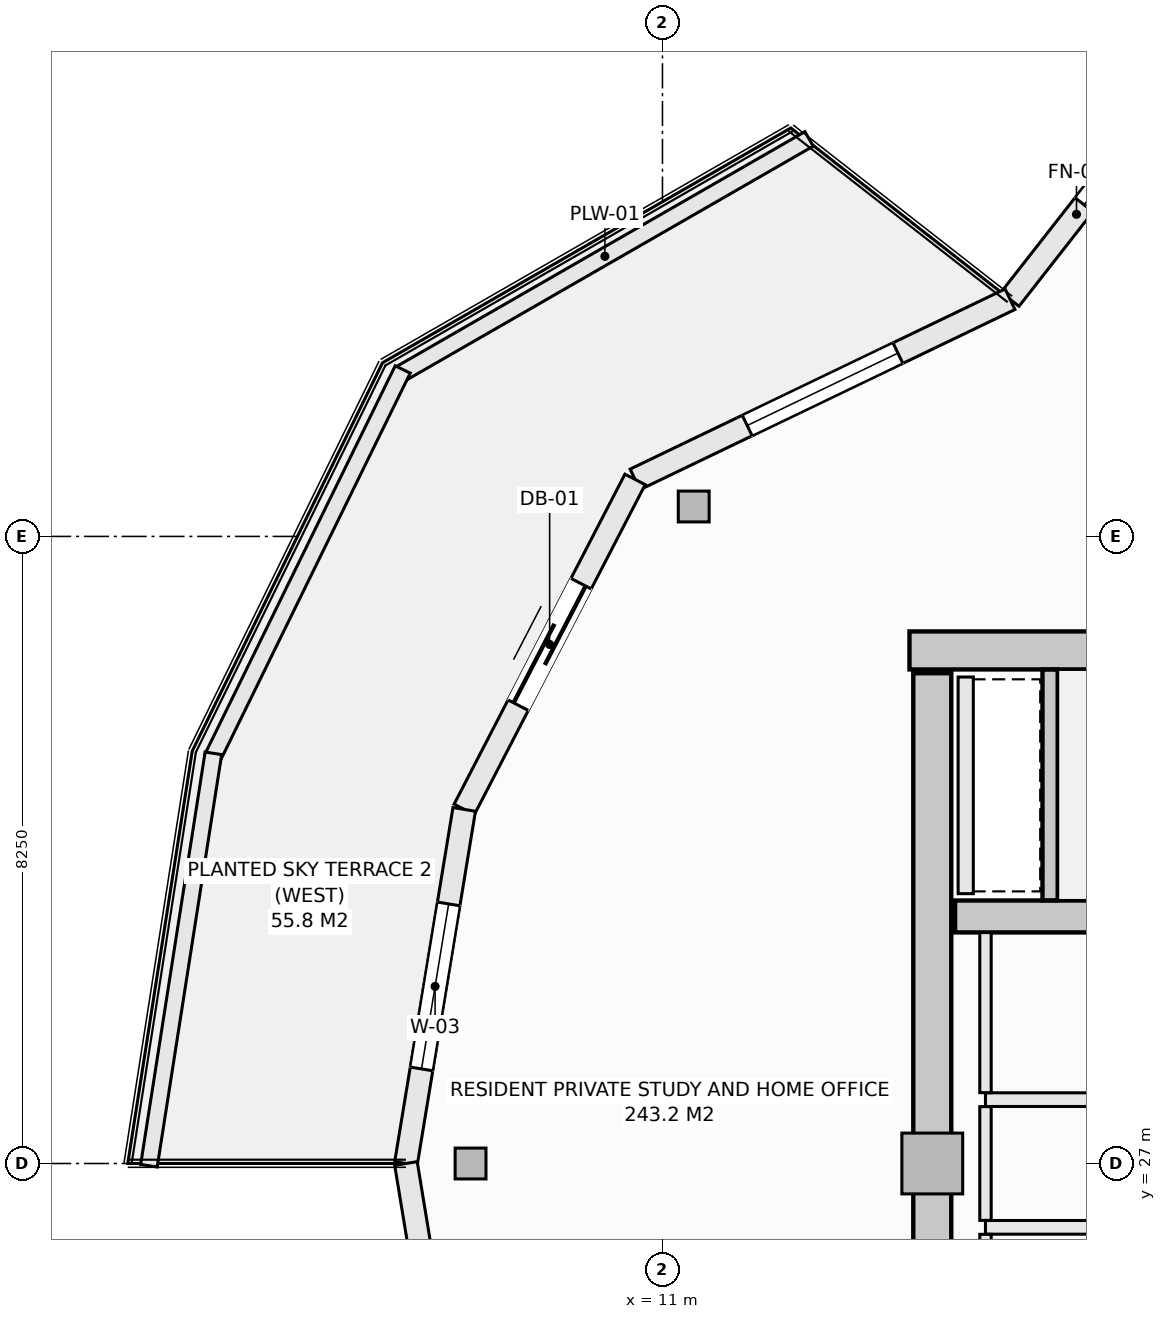
"""IFC4 building model, lengths in metres.
Left out: names, types, materials, properties, quantities, classifications, styles, units other than length and angle.
Written with IfcOpenShell. Run it as: python <this file> out.ifc"""

import sys

from ifc_helpers import new_model, si_unit, direction, frame, frame_2d, origin, origin_2d, place, context, subcontext, project, spatial, rectangle, hollow_rectangle, extrude, element, fill, save


model = new_model("IFC4")
c1 = context("Model", 3, precision=1e-05, world=origin(), true_north=direction((0.0, 1.0)))
c2 = subcontext(c1, "Body", "Model", "MODEL_VIEW")
j1 = project(units=[si_unit("LENGTHUNIT", "METRE"), si_unit("PLANEANGLEUNIT", "RADIAN")], contexts=[c1])
p1 = place(None, origin())
s1 = spatial("IfcSite", under=j1, at=p1, CompositionType="ELEMENT")
p2 = place(p1, origin())
s2 = spatial("IfcBuilding", under=s1, at=p2, CompositionType="ELEMENT")
p3 = place(p2, frame((0.0, 0.0, 249.2)))
s3 = spatial("IfcBuildingStorey", under=s2, at=p3, CompositionType="ELEMENT", Elevation=249.2)
p4 = place(p3, frame((14.25, 33.75, -0.27), z_axis=(0.0, 0.0, 1.0), x_axis=(1.0, 0.0, 0.0)))
e1 = element("IfcWall", 1, at=p4, inside=s3, PredefinedType="SHEAR", context=c2, shape_type="SweptSolid", body=[
    extrude(rectangle(XDim=13.5, YDim=0.5, at=frame_2d((6.75, 0.0))), origin(), (0.0, 0.0, 1.0), 3.3),
])
p5 = place(p3, frame((14.55, 20.55, -0.27), z_axis=(0.0, 0.0, 1.0), x_axis=(0.0, 1.0, 0.0)))
e2 = element("IfcWall", 2, at=p5, inside=s3, PredefinedType="SHEAR", context=c2, shape_type="SweptSolid", body=[
    extrude(rectangle(XDim=12.9, YDim=0.5, at=frame_2d((6.45, 0.0))), origin(), (0.0, 0.0, 1.0), 3.3),
])
p6 = place(p3, frame((14.85, 30.25, -0.27), z_axis=(0.0, 0.0, 1.0), x_axis=(1.0, 0.0, 0.0)))
e3 = element("IfcWall", 3, at=p6, inside=s3, PredefinedType="SHEAR", context=c2, shape_type="SweptSolid", body=[
    extrude(rectangle(XDim=7.3, YDim=0.42, at=frame_2d((3.65, 0.0))), origin(), (0.0, 0.0, 1.0), 3.3),
])
for number, where, z_axis, x_axis in (
    (4, (11.411, 35.644, -0.27), (0.0, 0.0, 1.0), (1.0, 0.0, 0.0)),
    (5, (8.475, 27.0, -0.27), (0.0, 0.0, 1.0), (1.0, 0.0, 0.0)),
):
    element("IfcColumn", number, at=place(p3, frame(where, z_axis=z_axis, x_axis=x_axis)), inside=s3, PredefinedType="COLUMN", context=c2, shape_type="SweptSolid", body=[
        extrude(hollow_rectangle(XDim=0.406, YDim=0.406, WallThickness=0.016, at=origin_2d()), origin(), (0.0, 0.0, 1.0), 3.3),
    ])
p7 = place(p3, frame((14.55, 27.0, -0.27), z_axis=(0.0, 0.0, 1.0), x_axis=(1.0, 0.0, 0.0)))
e6 = element("IfcColumn", 6, at=p7, inside=s3, PredefinedType="PILASTER", context=c2, shape_type="SweptSolid", body=[
    extrude(rectangle(XDim=0.8, YDim=0.8, at=origin_2d()), origin(), (0.0, 0.0, 1.0), 3.3),
])
p8 = place(p3, frame((15.573, 38.37, 0.0), z_axis=(0.0, 0.0, 1.0), x_axis=(0.61644588519, 0.787397276241, 0.0)))
e7 = element("IfcWall", 7, at=p8, inside=s3, PredefinedType="SOLIDWALL", context=c2, shape_type="SweptSolid", body=[
    extrude(rectangle(XDim=5.357, YDim=0.3, at=frame_2d((2.678, 0.0))), origin(), (0.0, 0.0, 1.0), 2.605),
])
p9 = place(p8, frame((1.579, 0.0, 0.72)))
e8 = element("IfcOpeningElement", 8, at=p9, cuts=e7, PredefinedType="OPENING", context=c2, shape_type="SweptSolid", body=[
    extrude(rectangle(XDim=2.2, YDim=1.65, at=frame_2d((1.1, 0.825))), frame((0.0, 0.16, 0.0), z_axis=(0.0, -1.0, 0.0), x_axis=(1.0, 0.0, 0.0)), (0.0, 0.0, 1.0), 0.32),
])
p10 = place(p3, frame((10.639, 36.0, 0.0), z_axis=(0.0, 0.0, 1.0), x_axis=(0.901355238351, 0.433080517106, 0.0)))
e9 = element("IfcWall", 9, at=p10, inside=s3, PredefinedType="SOLIDWALL", context=c2, shape_type="SweptSolid", body=[
    extrude(rectangle(XDim=5.473, YDim=0.3, at=frame_2d((2.737, 0.0))), origin(), (0.0, 0.0, 1.0), 2.605),
])
p11 = place(p10, frame((1.637, 0.0, 0.72)))
e10 = element("IfcOpeningElement", 10, at=p11, cuts=e9, PredefinedType="OPENING", context=c2, shape_type="SweptSolid", body=[
    extrude(rectangle(XDim=2.2, YDim=1.65, at=frame_2d((1.1, 0.825))), frame((0.0, 0.16, 0.0), z_axis=(0.0, -1.0, 0.0), x_axis=(1.0, 0.0, 0.0)), (0.0, 0.0, 1.0), 0.32),
])
p12 = place(p3, frame((8.392, 31.659, 0.0), z_axis=(0.0, 0.0, 1.0), x_axis=(0.459793771602, 0.888025724625, 0.0)))
e11 = element("IfcWall", 11, at=p12, inside=s3, PredefinedType="SOLIDWALL", context=c2, shape_type="SweptSolid", body=[
    extrude(rectangle(XDim=4.889, YDim=0.3, at=frame_2d((2.444, 0.0))), origin(), (0.0, 0.0, 1.0), 2.605),
])
p13 = place(p12, frame((1.544, 0.0, 0.0)))
e12 = element("IfcOpeningElement", 12, at=p13, cuts=e11, PredefinedType="OPENING", context=c2, shape_type="SweptSolid", body=[
    extrude(rectangle(XDim=1.8, YDim=2.25, at=frame_2d((0.9, 1.125))), frame((0.0, 0.16, 0.0), z_axis=(0.0, -1.0, 0.0), x_axis=(1.0, 0.0, 0.0)), (0.0, 0.0, 1.0), 0.32),
])
p14 = place(p3, frame((7.625, 27.0, 0.0), z_axis=(0.0, 0.0, 1.0), x_axis=(0.162369371657, 0.986730047758, 0.0)))
e13 = element("IfcWall", 13, at=p14, inside=s3, PredefinedType="SOLIDWALL", context=c2, shape_type="SweptSolid", body=[
    extrude(rectangle(XDim=4.721, YDim=0.3, at=frame_2d((2.361, 0.0))), origin(), (0.0, 0.0, 1.0), 2.605),
])
p15 = place(p14, frame((1.261, 0.0, 0.72)))
e14 = element("IfcOpeningElement", 14, at=p15, cuts=e13, PredefinedType="OPENING", context=c2, shape_type="SweptSolid", body=[
    extrude(rectangle(XDim=2.2, YDim=1.65, at=frame_2d((1.1, 0.825))), frame((0.0, 0.16, 0.0), z_axis=(0.0, -1.0, 0.0), x_axis=(1.0, 0.0, 0.0)), (0.0, 0.0, 1.0), 0.32),
])
p16 = place(p3, frame((7.625, 27.0, 0.0), z_axis=(0.0, 0.0, 1.0), x_axis=(0.162369371657, -0.986730047758, 0.0)))
e15 = element("IfcWall", 15, at=p16, inside=s3, PredefinedType="SOLIDWALL", context=c2, shape_type="SweptSolid", body=[
    extrude(rectangle(XDim=4.721, YDim=0.3, at=frame_2d((2.361, 0.0))), origin(), (0.0, 0.0, 1.0), 2.605),
])
p17 = place(p16, frame((1.261, 0.0, 0.72)))
e16 = element("IfcOpeningElement", 16, at=p17, cuts=e15, PredefinedType="OPENING", context=c2, shape_type="SweptSolid", body=[
    extrude(rectangle(XDim=2.2, YDim=1.65, at=frame_2d((1.1, 0.825))), frame((0.0, 0.16, 0.0), z_axis=(0.0, -1.0, 0.0), x_axis=(1.0, 0.0, 0.0)), (0.0, 0.0, 1.0), 0.32),
])
p18 = place(p3, frame((7.557, 37.391, 0.0), z_axis=(0.0, 0.0, 1.0), x_axis=(0.866901621005, 0.49847926687, 0.0)))
e17 = element("IfcWall", 17, at=p18, inside=s3, PredefinedType="PARAPET", context=c2, shape_type="SweptSolid", body=[
    extrude(rectangle(XDim=6.197, YDim=0.22, at=frame_2d((3.098, 0.0))), origin(), (0.0, 0.0, 1.0), 0.52),
])
p19 = place(p3, frame((5.079, 32.338, 0.0), z_axis=(0.0, 0.0, 1.0), x_axis=(0.440058847499, 0.897968936399, 0.0)))
e18 = element("IfcWall", 18, at=p19, inside=s3, PredefinedType="PARAPET", context=c2, shape_type="SweptSolid", body=[
    extrude(rectangle(XDim=5.689, YDim=0.22, at=frame_2d((2.845, 0.0))), origin(), (0.0, 0.0, 1.0), 0.52),
])
p20 = place(p3, frame((4.243, 26.971, 0.0), z_axis=(0.0, 0.0, 1.0), x_axis=(0.154441975483, 0.988001860428, 0.0)))
e19 = element("IfcWall", 19, at=p20, inside=s3, PredefinedType="PARAPET", context=c2, shape_type="SweptSolid", body=[
    extrude(rectangle(XDim=5.492, YDim=0.22, at=frame_2d((2.746, 0.0))), origin(), (0.0, 0.0, 1.0), 0.52),
])
p21 = place(p3, frame((16.1, 30.462, -0.27), z_axis=(0.0, 0.0, 1.0), x_axis=(0.0, 1.0, 0.0)))
e20 = element("IfcWall", 20, at=p21, inside=s3, PredefinedType="SHEAR", context=c2, shape_type="SweptSolid", body=[
    extrude(rectangle(XDim=3.036, YDim=0.2, at=frame_2d((1.518, 0.0))), origin(), (0.0, 0.0, 1.0), 3.3),
])
p22 = place(p3, frame((14.99, 30.55, 0.0), z_axis=(0.0, 0.0, 1.0), x_axis=(0.0, 1.0, 0.0)))
e21 = element("IfcWall", 21, at=p22, inside=s3, PredefinedType="SOLIDWALL", context=c2, shape_type="SweptSolid", body=[
    extrude(rectangle(XDim=2.85, YDim=0.2, at=frame_2d((1.425, 0.0))), origin(), (0.0, 0.0, 1.0), 3.03),
])
p23 = place(p3, frame((15.25, 27.84, 0.0), z_axis=(0.0, 0.0, 1.0), x_axis=(1.0, 0.0, 0.0)))
e22 = element("IfcWall", 22, at=p23, inside=s3, PredefinedType="SOLIDWALL", context=c2, shape_type="SweptSolid", body=[
    extrude(rectangle(XDim=6.9, YDim=0.18, at=frame_2d((3.45, 0.0))), origin(), (0.0, 0.0, 1.0), 3.03),
])
p24 = place(p23, frame((5.02, 0.0, 0.0)))
e23 = element("IfcOpeningElement", 23, at=p24, cuts=e22, PredefinedType="OPENING", context=c2, shape_type="SweptSolid", body=[
    extrude(rectangle(XDim=0.95, YDim=2.1, at=frame_2d((0.475, 1.05))), frame((0.0, 0.1, 0.0), z_axis=(0.0, -1.0, 0.0), x_axis=(1.0, 0.0, 0.0)), (0.0, 0.0, 1.0), 0.2),
])
p25 = place(p23, frame((1.98, 0.0, 0.0)))
e24 = element("IfcOpeningElement", 24, at=p25, cuts=e22, PredefinedType="OPENING", context=c2, shape_type="SweptSolid", body=[
    extrude(rectangle(XDim=0.95, YDim=2.1, at=frame_2d((0.475, 1.05))), frame((0.0, 0.1, 0.0), z_axis=(0.0, -1.0, 0.0), x_axis=(1.0, 0.0, 0.0)), (0.0, 0.0, 1.0), 0.2),
])
p26 = place(p3, frame((15.25, 26.16, 0.0), z_axis=(0.0, 0.0, 1.0), x_axis=(1.0, 0.0, 0.0)))
e25 = element("IfcWall", 25, at=p26, inside=s3, PredefinedType="SOLIDWALL", context=c2, shape_type="SweptSolid", body=[
    extrude(rectangle(XDim=6.9, YDim=0.18, at=frame_2d((3.45, 0.0))), origin(), (0.0, 0.0, 1.0), 3.03),
])
p27 = place(p26, frame((5.02, 0.0, 0.0)))
e26 = element("IfcOpeningElement", 26, at=p27, cuts=e25, PredefinedType="OPENING", context=c2, shape_type="SweptSolid", body=[
    extrude(rectangle(XDim=0.95, YDim=2.1, at=frame_2d((0.475, 1.05))), frame((0.0, 0.1, 0.0), z_axis=(0.0, -1.0, 0.0), x_axis=(1.0, 0.0, 0.0)), (0.0, 0.0, 1.0), 0.2),
])
p28 = place(p26, frame((1.98, 0.0, 0.0)))
e27 = element("IfcOpeningElement", 27, at=p28, cuts=e25, PredefinedType="OPENING", context=c2, shape_type="SweptSolid", body=[
    extrude(rectangle(XDim=0.95, YDim=2.1, at=frame_2d((0.475, 1.05))), frame((0.0, 0.1, 0.0), z_axis=(0.0, -1.0, 0.0), x_axis=(1.0, 0.0, 0.0)), (0.0, 0.0, 1.0), 0.2),
])
p29 = place(p3, frame((15.25, 23.962, 0.0), z_axis=(0.0, 0.0, 1.0), x_axis=(0.0, 1.0, 0.0)))
e28 = element("IfcWall", 28, at=p29, inside=s3, PredefinedType="PARTITIONING", context=c2, shape_type="SweptSolid", body=[
    extrude(rectangle(XDim=2.106, YDim=0.15, at=frame_2d((1.053, 0.0))), origin(), (0.0, 0.0, 1.0), 3.03),
])
p30 = place(p3, frame((15.25, 26.252, 0.0), z_axis=(0.0, 0.0, 1.0), x_axis=(0.0, 1.0, 0.0)))
e29 = element("IfcWall", 29, at=p30, inside=s3, PredefinedType="PARTITIONING", context=c2, shape_type="SweptSolid", body=[
    extrude(rectangle(XDim=1.496, YDim=0.15, at=frame_2d((0.748, 0.0))), origin(), (0.0, 0.0, 1.0), 3.03),
])
p31 = place(p3, frame((15.25, 27.932, 0.0), z_axis=(0.0, 0.0, 1.0), x_axis=(0.0, 1.0, 0.0)))
e30 = element("IfcWall", 30, at=p31, inside=s3, PredefinedType="PARTITIONING", context=c2, shape_type="SweptSolid", body=[
    extrude(rectangle(XDim=2.106, YDim=0.15, at=frame_2d((1.053, 0.0))), origin(), (0.0, 0.0, 1.0), 3.03),
])
p32 = place(p9, origin())
e31 = element("IfcWindow", 31, at=p32, inside=s3, PartitioningType="SINGLE_PANEL", PredefinedType="WINDOW", context=c2, shape_type="SweptSolid", body=[
    extrude(rectangle(XDim=2.2, YDim=1.65, at=frame_2d((1.1, 0.825))), frame((0.0, 0.03, 0.0), z_axis=(0.0, -1.0, 0.0), x_axis=(1.0, 0.0, 0.0)), (0.0, 0.0, 1.0), 0.06),
])
fill(e8, e31)
p33 = place(p11, origin())
e32 = element("IfcWindow", 32, at=p33, inside=s3, PartitioningType="SINGLE_PANEL", PredefinedType="WINDOW", context=c2, shape_type="SweptSolid", body=[
    extrude(rectangle(XDim=2.2, YDim=1.65, at=frame_2d((1.1, 0.825))), frame((0.0, 0.03, 0.0), z_axis=(0.0, -1.0, 0.0), x_axis=(1.0, 0.0, 0.0)), (0.0, 0.0, 1.0), 0.06),
])
fill(e10, e32)
p34 = place(p13, origin())
e33 = element("IfcDoor", 33, at=p34, inside=s3, OperationType="SLIDING_TO_LEFT", PredefinedType="DOOR", context=c2, shape_type="SweptSolid", body=[
    extrude(rectangle(XDim=1.8, YDim=2.25, at=frame_2d((0.9, 1.125))), frame((0.0, 0.025, 0.0), z_axis=(0.0, -1.0, 0.0), x_axis=(1.0, 0.0, 0.0)), (0.0, 0.0, 1.0), 0.05),
])
fill(e12, e33)
p35 = place(p15, origin())
e34 = element("IfcWindow", 34, at=p35, inside=s3, PartitioningType="SINGLE_PANEL", PredefinedType="WINDOW", context=c2, shape_type="SweptSolid", body=[
    extrude(rectangle(XDim=2.2, YDim=1.65, at=frame_2d((1.1, 0.825))), frame((0.0, 0.03, 0.0), z_axis=(0.0, -1.0, 0.0), x_axis=(1.0, 0.0, 0.0)), (0.0, 0.0, 1.0), 0.06),
])
fill(e14, e34)
save(model, sys.argv[1])
